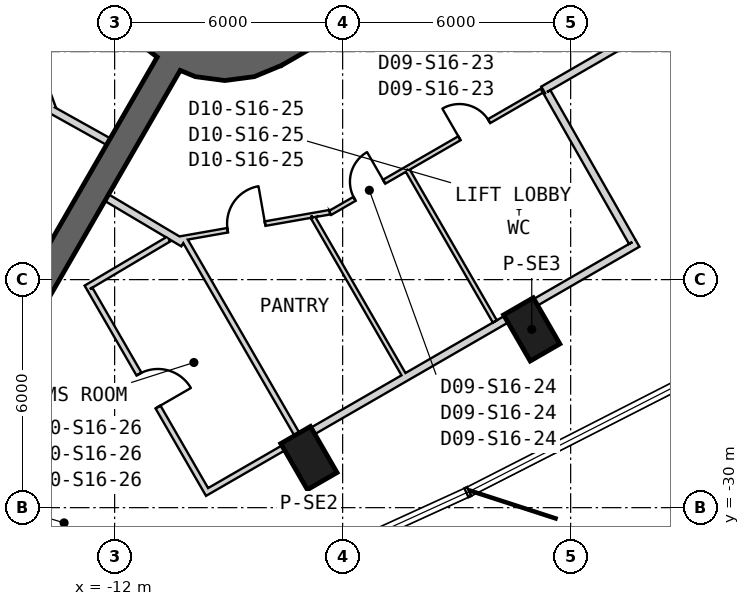
"""IFC4 building model, lengths in metres.
Left out: names, types, materials, properties, quantities, classifications, styles, units other than length and angle.
Written with IfcOpenShell. Run it as: python <this file> out.ifc"""

import sys

from ifc_helpers import new_model, si_unit, direction, frame, frame_2d, origin, origin_2d, place, context, subcontext, project, spatial, polyline, rectangle, outline, extrude, element, fill, save


model = new_model("IFC4")
c1 = context("Model", 3, precision=1e-05, world=origin(), true_north=direction((0.0, 1.0)))
c2 = subcontext(c1, "Body", "Model", "MODEL_VIEW")
j1 = project(units=[si_unit("LENGTHUNIT", "METRE"), si_unit("PLANEANGLEUNIT", "RADIAN")], contexts=[c1])
p1 = place(None, origin())
s1 = spatial("IfcSite", under=j1, at=p1, CompositionType="ELEMENT")
p2 = place(p1, origin())
s2 = spatial("IfcBuilding", under=s1, at=p2, CompositionType="ELEMENT")
p3 = place(p2, frame((0.0, 0.0, 253.2)))
s3 = spatial("IfcBuildingStorey", under=s2, at=p3, CompositionType="ELEMENT", Elevation=253.2)
for number, where, z_axis, x_axis in (
    (1, (-6.888, -28.696, 0.0), (0.0, 0.0, 1.0), (0.5, -0.866, 0.0)),
    (2, (-1.024, -25.31, 0.0), (0.0, 0.0, 1.0), (0.5, -0.866, 0.0)),
):
    element("IfcColumn", number, at=place(p3, frame(where, z_axis=z_axis, x_axis=x_axis)), inside=s3, PredefinedType="COLUMN", context=c2, shape_type="SweptSolid", body=[
        extrude(rectangle(XDim=1.4, YDim=0.9, at=origin_2d()), origin(), (0.0, 0.0, 1.0), 4.0),
    ])
p4 = place(p3, frame((-7.825, -17.97, 0.0), z_axis=(0.0, 0.0, 1.0), x_axis=(0.866028369851, 0.499994862586, 0.0)))
e3 = element("IfcWall", 3, at=p4, inside=s3, PredefinedType="SHEAR", context=c2, shape_type="SweptSolid", body=[
    extrude(rectangle(XDim=31.523, YDim=0.9, at=frame_2d((15.762, 0.0))), origin(), (0.0, 0.0, 1.0), 4.0),
])
p5 = place(p4, frame((7.062, 0.0, 0.0)))
e4 = element("IfcOpeningElement", 4, at=p5, cuts=e3, PredefinedType="OPENING", context=c2, shape_type="SweptSolid", body=[
    extrude(rectangle(XDim=1.2, YDim=2.4, at=frame_2d((0.6, 1.2))), frame((0.0, 0.46, 0.0), z_axis=(0.0, -1.0, 0.0), x_axis=(1.0, 0.0, 0.0)), (0.0, 0.0, 1.0), 0.92),
])
p6 = place(p4, frame((9.762, 0.0, 0.0)))
e5 = element("IfcOpeningElement", 5, at=p6, cuts=e3, PredefinedType="OPENING", context=c2, shape_type="SweptSolid", body=[
    extrude(rectangle(XDim=1.2, YDim=2.4, at=frame_2d((0.6, 1.2))), frame((0.0, 0.46, 0.0), z_axis=(0.0, -1.0, 0.0), x_axis=(1.0, 0.0, 0.0)), (0.0, 0.0, 1.0), 0.92),
])
p7 = place(p4, frame((12.462, 0.0, 0.0)))
e6 = element("IfcOpeningElement", 6, at=p7, cuts=e3, PredefinedType="OPENING", context=c2, shape_type="SweptSolid", body=[
    extrude(rectangle(XDim=1.2, YDim=2.4, at=frame_2d((0.6, 1.2))), frame((0.0, 0.46, 0.0), z_axis=(0.0, -1.0, 0.0), x_axis=(1.0, 0.0, 0.0)), (0.0, 0.0, 1.0), 0.92),
])
p8 = place(p4, frame((15.162, 0.0, 0.0)))
e7 = element("IfcOpeningElement", 7, at=p8, cuts=e3, PredefinedType="OPENING", context=c2, shape_type="SweptSolid", body=[
    extrude(rectangle(XDim=1.2, YDim=2.4, at=frame_2d((0.6, 1.2))), frame((0.0, 0.46, 0.0), z_axis=(0.0, -1.0, 0.0), x_axis=(1.0, 0.0, 0.0)), (0.0, 0.0, 1.0), 0.92),
])
p9 = place(p4, frame((17.862, 0.0, 0.0)))
e8 = element("IfcOpeningElement", 8, at=p9, cuts=e3, PredefinedType="OPENING", context=c2, shape_type="SweptSolid", body=[
    extrude(rectangle(XDim=1.2, YDim=2.4, at=frame_2d((0.6, 1.2))), frame((0.0, 0.46, 0.0), z_axis=(0.0, -1.0, 0.0), x_axis=(1.0, 0.0, 0.0)), (0.0, 0.0, 1.0), 0.92),
])
p10 = place(p4, frame((20.562, 0.0, 0.0)))
e9 = element("IfcOpeningElement", 9, at=p10, cuts=e3, PredefinedType="OPENING", context=c2, shape_type="SweptSolid", body=[
    extrude(rectangle(XDim=1.2, YDim=2.4, at=frame_2d((0.6, 1.2))), frame((0.0, 0.46, 0.0), z_axis=(0.0, -1.0, 0.0), x_axis=(1.0, 0.0, 0.0)), (0.0, 0.0, 1.0), 0.92),
])
p11 = place(p4, frame((26.712, 0.0, 0.0)))
e10 = element("IfcOpeningElement", 10, at=p11, cuts=e3, PredefinedType="OPENING", context=c2, shape_type="SweptSolid", body=[
    extrude(rectangle(XDim=1.2, YDim=2.4, at=frame_2d((0.6, 1.2))), frame((0.0, 0.46, 0.0), z_axis=(0.0, -1.0, 0.0), x_axis=(1.0, 0.0, 0.0)), (0.0, 0.0, 1.0), 0.92),
])
p12 = place(p4, frame((3.612, 0.0, 0.0)))
e11 = element("IfcOpeningElement", 11, at=p12, cuts=e3, PredefinedType="OPENING", context=c2, shape_type="SweptSolid", body=[
    extrude(rectangle(XDim=1.2, YDim=2.4, at=frame_2d((0.6, 1.2))), frame((0.0, 0.46, 0.0), z_axis=(0.0, -1.0, 0.0), x_axis=(1.0, 0.0, 0.0)), (0.0, 0.0, 1.0), 0.92),
])
p13 = place(p3, origin())
e12 = element("IfcWall", 12, at=p13, inside=s3, PredefinedType="SHEAR", context=c2, shape_type="SweptSolid", body=[
    extrude(outline(polyline([(-12.1, -15.762), (-11.998, -16.538), (-11.698, -17.262), (-11.221, -17.883), (-10.6, -18.36), (-9.876, -18.659), (-9.1, -18.762), (-8.323, -18.659), (-7.6, -18.36), (-8.05, -17.58), (-8.556, -17.79), (-9.1, -17.862), (-9.644, -17.79), (-10.15, -17.58), (-10.585, -17.247), (-10.919, -16.812), (-11.128, -16.305), (-11.2, -15.762), (-12.1, -15.762)])), origin(), (0.0, 0.0, 1.0), 4.0),
])
p14 = place(p3, frame((-10.575, -18.316, 0.0), z_axis=(0.0, 0.0, 1.0), x_axis=(-0.500010108608, -0.866019567498, 0.0)))
e13 = element("IfcWall", 13, at=p14, inside=s3, PredefinedType="SHEAR", context=c2, shape_type="SweptSolid", body=[
    extrude(rectangle(XDim=10.432, YDim=0.7, at=frame_2d((5.216, 0.0))), origin(), (0.0, 0.0, 1.0), 4.0),
])
p15 = place(p3, frame((-13.722, -19.499, 0.0), z_axis=(0.0, 0.0, 1.0), x_axis=(0.873381780332, -0.487036205824, 0.0)))
e14 = element("IfcWall", 14, at=p15, inside=s3, PredefinedType="PARTITIONING", context=c2, shape_type="SweptSolid", body=[
    extrude(rectangle(XDim=1.785, YDim=0.2, at=frame_2d((0.892, 0.0))), origin(), (0.0, 0.0, 1.0), 3.7),
])
p16 = place(p3, frame((-14.834, -16.223, 0.0), z_axis=(0.0, 0.0, 1.0), x_axis=(0.342017717312, -0.939693503779, 0.0)))
e15 = element("IfcWall", 15, at=p16, inside=s3, PredefinedType="PARTITIONING", context=c2, shape_type="SweptSolid", body=[
    extrude(rectangle(XDim=3.497, YDim=0.2, at=frame_2d((1.749, 0.0))), origin(), (0.0, 0.0, 1.0), 2.88),
])
p17 = place(p3, frame((-6.332, -22.246, 0.0), z_axis=(0.0, 0.0, 1.0), x_axis=(0.866059848015, 0.499940336097, 0.0)))
e16 = element("IfcWall", 16, at=p17, inside=s3, PredefinedType="PARTITIONING", context=c2, shape_type="SweptSolid", body=[
    extrude(rectangle(XDim=2.328, YDim=0.12, at=frame_2d((1.164, 0.0))), origin(), (0.0, 0.0, 1.0), 2.98),
])
p18 = place(p17, frame((0.744, 0.0, 0.0)))
e17 = element("IfcOpeningElement", 17, at=p18, cuts=e16, PredefinedType="OPENING", context=c2, shape_type="SweptSolid", body=[
    extrude(rectangle(XDim=0.9, YDim=2.1, at=frame_2d((0.45, 1.05))), frame((0.0, 0.07, 0.0), z_axis=(0.0, -1.0, 0.0), x_axis=(1.0, 0.0, 0.0)), (0.0, 0.0, 1.0), 0.14),
])
p19 = place(p3, frame((-4.315, -21.082, 0.0), z_axis=(0.0, 0.0, 1.0), x_axis=(0.866018339482, 0.500012235531, 0.0)))
e18 = element("IfcWall", 18, at=p19, inside=s3, PredefinedType="PARTITIONING", context=c2, shape_type="SweptSolid", body=[
    extrude(rectangle(XDim=4.108, YDim=0.12, at=frame_2d((2.054, 0.0))), origin(), (0.0, 0.0, 1.0), 2.98),
])
p20 = place(p19, frame((1.604, 0.0, 0.0)))
e19 = element("IfcOpeningElement", 19, at=p20, cuts=e18, PredefinedType="OPENING", context=c2, shape_type="SweptSolid", body=[
    extrude(rectangle(XDim=0.9, YDim=2.1, at=frame_2d((0.45, 1.05))), frame((0.0, 0.07, 0.0), z_axis=(0.0, -1.0, 0.0), x_axis=(1.0, 0.0, 0.0)), (0.0, 0.0, 1.0), 0.14),
])
p21 = place(p3, frame((-0.723, -19.008, 0.0), z_axis=(0.0, 0.0, 1.0), x_axis=(0.866014659605, 0.500018609004, 0.0)))
e20 = element("IfcWall", 20, at=p21, inside=s3, PredefinedType="PARTITIONING", context=c2, shape_type="SweptSolid", body=[
    extrude(rectangle(XDim=5.78, YDim=0.2, at=frame_2d((2.89, 0.0))), origin(), (0.0, 0.0, 1.0), 2.98),
])
p22 = place(p3, frame((-12.207, -21.844, 0.0), z_axis=(0.0, 0.0, 1.0), x_axis=(0.859839010211, -0.510565251971, 0.0)))
e21 = element("IfcWall", 21, at=p22, inside=s3, PredefinedType="PARTITIONING", context=c2, shape_type="SweptSolid", body=[
    extrude(rectangle(XDim=2.342, YDim=0.2, at=frame_2d((1.171, 0.0))), origin(), (0.0, 0.0, 1.0), 3.7),
])
p23 = place(p3, frame((-10.448, -22.951, 0.0), z_axis=(0.0, 0.0, 1.0), x_axis=(0.984811576761, 0.173626490713, 0.0)))
e22 = element("IfcWall", 22, at=p23, inside=s3, PredefinedType="PARTITIONING", context=c2, shape_type="SweptSolid", body=[
    extrude(rectangle(XDim=3.683, YDim=0.12, at=frame_2d((1.841, 0.0))), origin(), (0.0, 0.0, 1.0), 2.88),
])
p24 = place(p23, frame((1.444, 0.0, 0.0)))
e23 = element("IfcOpeningElement", 23, at=p24, cuts=e22, PredefinedType="OPENING", context=c2, shape_type="SweptSolid", body=[
    extrude(rectangle(XDim=1.0, YDim=2.1, at=frame_2d((0.5, 1.05))), frame((0.0, 0.07, 0.0), z_axis=(0.0, -1.0, 0.0), x_axis=(1.0, 0.0, 0.0)), (0.0, 0.0, 1.0), 0.14),
])
p25 = place(p3, frame((-6.821, -22.312, 0.0), z_axis=(0.0, 0.0, 1.0), x_axis=(0.984758463347, 0.173927481634, 0.0)))
e24 = element("IfcWall", 24, at=p25, inside=s3, PredefinedType="PARTITIONING", context=c2, shape_type="SweptSolid", body=[
    extrude(rectangle(XDim=0.49, YDim=0.12, at=frame_2d((0.245, 0.0))), origin(), (0.0, 0.0, 1.0), 3.7),
])
p26 = place(p3, frame((1.76, -23.048, 0.0), z_axis=(0.0, 0.0, 1.0), x_axis=(-0.866021621257, -0.500006551472, 0.0)))
e25 = element("IfcWall", 25, at=p26, inside=s3, PredefinedType="PARTITIONING", context=c2, shape_type="SweptSolid", body=[
    extrude(rectangle(XDim=10.265, YDim=0.2, at=frame_2d((5.133, 0.0))), origin(), (0.0, 0.0, 1.0), 2.98),
])
p27 = place(p3, frame((1.624, -23.011, 0.0), z_axis=(0.0, 0.0, 1.0), x_axis=(-0.49451654464, 0.869168215639, 0.0)))
e26 = element("IfcWall", 26, at=p27, inside=s3, PredefinedType="PARTITIONING", context=c2, shape_type="SweptSolid", body=[
    extrude(rectangle(XDim=4.54, YDim=0.2, at=frame_2d((2.27, 0.0))), origin(), (0.0, 0.0, 1.0), 2.98),
])
p28 = place(p3, frame((-10.574, -22.93, 0.0), z_axis=(0.0, 0.0, 1.0), x_axis=(-0.86012706177, -0.510079834547, 0.0)))
e27 = element("IfcWall", 27, at=p28, inside=s3, PredefinedType="PLUMBINGWALL", context=c2, shape_type="SweptSolid", body=[
    extrude(rectangle(XDim=2.532, YDim=0.15, at=frame_2d((1.266, 0.0))), origin(), (0.0, 0.0, 1.0), 3.7),
])
p29 = place(p3, frame((-12.65, -24.249, 0.0), z_axis=(0.0, 0.0, 1.0), x_axis=(0.500027264788, -0.866009661879, 0.0)))
e28 = element("IfcWall", 28, at=p29, inside=s3, PredefinedType="PLUMBINGWALL", context=c2, shape_type="SweptSolid", body=[
    extrude(rectangle(XDim=6.24, YDim=0.15, at=frame_2d((3.12, 0.0))), origin(), (0.0, 0.0, 1.0), 2.88),
])
p30 = place(p29, frame((2.583, 0.0, 0.0)))
e29 = element("IfcOpeningElement", 29, at=p30, cuts=e28, PredefinedType="OPENING", context=c2, shape_type="SweptSolid", body=[
    extrude(rectangle(XDim=1.0, YDim=2.1, at=frame_2d((0.5, 1.05))), frame((0.0, 0.085, 0.0), z_axis=(0.0, -1.0, 0.0), x_axis=(1.0, 0.0, 0.0)), (0.0, 0.0, 1.0), 0.17),
])
p31 = place(p3, frame((-7.13, -28.181, 0.0), z_axis=(0.0, 0.0, 1.0), x_axis=(-0.866013438122, -0.500020724563, 0.0)))
e30 = element("IfcWall", 30, at=p31, inside=s3, PredefinedType="PLUMBINGWALL", context=c2, shape_type="SweptSolid", body=[
    extrude(rectangle(XDim=2.74, YDim=0.15, at=frame_2d((1.37, 0.0))), origin(), (0.0, 0.0, 1.0), 3.7),
])
p32 = place(p3, frame((-4.285, -21.134, 0.0), z_axis=(0.0, 0.0, 1.0), x_axis=(0.49999161165, -0.866030246746, 0.0)))
e31 = element("IfcWall", 31, at=p32, inside=s3, PredefinedType="PARTITIONING", context=c2, shape_type="SweptSolid", body=[
    extrude(rectangle(XDim=4.58, YDim=0.12, at=frame_2d((2.29, 0.0))), origin(), (0.0, 0.0, 1.0), 3.7),
])
p33 = place(p3, frame((-4.399, -26.488, 0.0), z_axis=(0.0, 0.0, 1.0), x_axis=(-0.499988794591, 0.866031873134, 0.0)))
e32 = element("IfcWall", 32, at=p33, inside=s3, PredefinedType="PARTITIONING", context=c2, shape_type="SweptSolid", body=[
    extrude(rectangle(XDim=4.761, YDim=0.12, at=frame_2d((2.38, 0.0))), origin(), (0.0, 0.0, 1.0), 2.98),
])
p34 = place(p3, frame((-10.153, -22.96, 0.0), z_axis=(0.0, 0.0, 1.0), x_axis=(0.500025256787, -0.866010821281, 0.0)))
e33 = element("IfcWall", 33, at=p34, inside=s3, PredefinedType="PLUMBINGWALL", context=c2, shape_type="SweptSolid", body=[
    extrude(rectangle(XDim=5.932, YDim=0.15, at=frame_2d((2.966, 0.0))), origin(), (0.0, 0.0, 1.0), 2.88),
])
p35 = place(p20, origin())
e34 = element("IfcDoor", 34, at=p35, inside=s3, OperationType="SINGLE_SWING_RIGHT", PredefinedType="NOTDEFINED", context=c2, shape_type="SweptSolid", body=[
    extrude(rectangle(XDim=0.9, YDim=2.1, at=frame_2d((0.45, 1.05))), frame((0.0, 0.025, 0.0), z_axis=(0.0, -1.0, 0.0), x_axis=(1.0, 0.0, 0.0)), (0.0, 0.0, 1.0), 0.05),
])
fill(e19, e34)
p36 = place(p18, origin())
e35 = element("IfcDoor", 35, at=p36, inside=s3, OperationType="SINGLE_SWING_RIGHT", PredefinedType="NOTDEFINED", context=c2, shape_type="SweptSolid", body=[
    extrude(rectangle(XDim=0.9, YDim=2.1, at=frame_2d((0.45, 1.05))), frame((0.0, 0.025, 0.0), z_axis=(0.0, -1.0, 0.0), x_axis=(1.0, 0.0, 0.0)), (0.0, 0.0, 1.0), 0.05),
])
fill(e17, e35)
p37 = place(p24, origin())
e36 = element("IfcDoor", 36, at=p37, inside=s3, OperationType="SINGLE_SWING_LEFT", PredefinedType="NOTDEFINED", context=c2, shape_type="SweptSolid", body=[
    extrude(rectangle(XDim=1.0, YDim=2.1, at=frame_2d((0.5, 1.05))), frame((0.0, 0.025, 0.0), z_axis=(0.0, -1.0, 0.0), x_axis=(1.0, 0.0, 0.0)), (0.0, 0.0, 1.0), 0.05),
])
fill(e23, e36)
p38 = place(p30, origin())
e37 = element("IfcDoor", 37, at=p38, inside=s3, OperationType="SINGLE_SWING_LEFT", PredefinedType="USERDEFINED", context=c2, shape_type="SweptSolid", body=[
    extrude(rectangle(XDim=1.0, YDim=2.1, at=frame_2d((0.5, 1.05))), frame((0.0, 0.025, 0.0), z_axis=(0.0, -1.0, 0.0), x_axis=(1.0, 0.0, 0.0)), (0.0, 0.0, 1.0), 0.05),
])
fill(e29, e37)
save(model, sys.argv[1])
